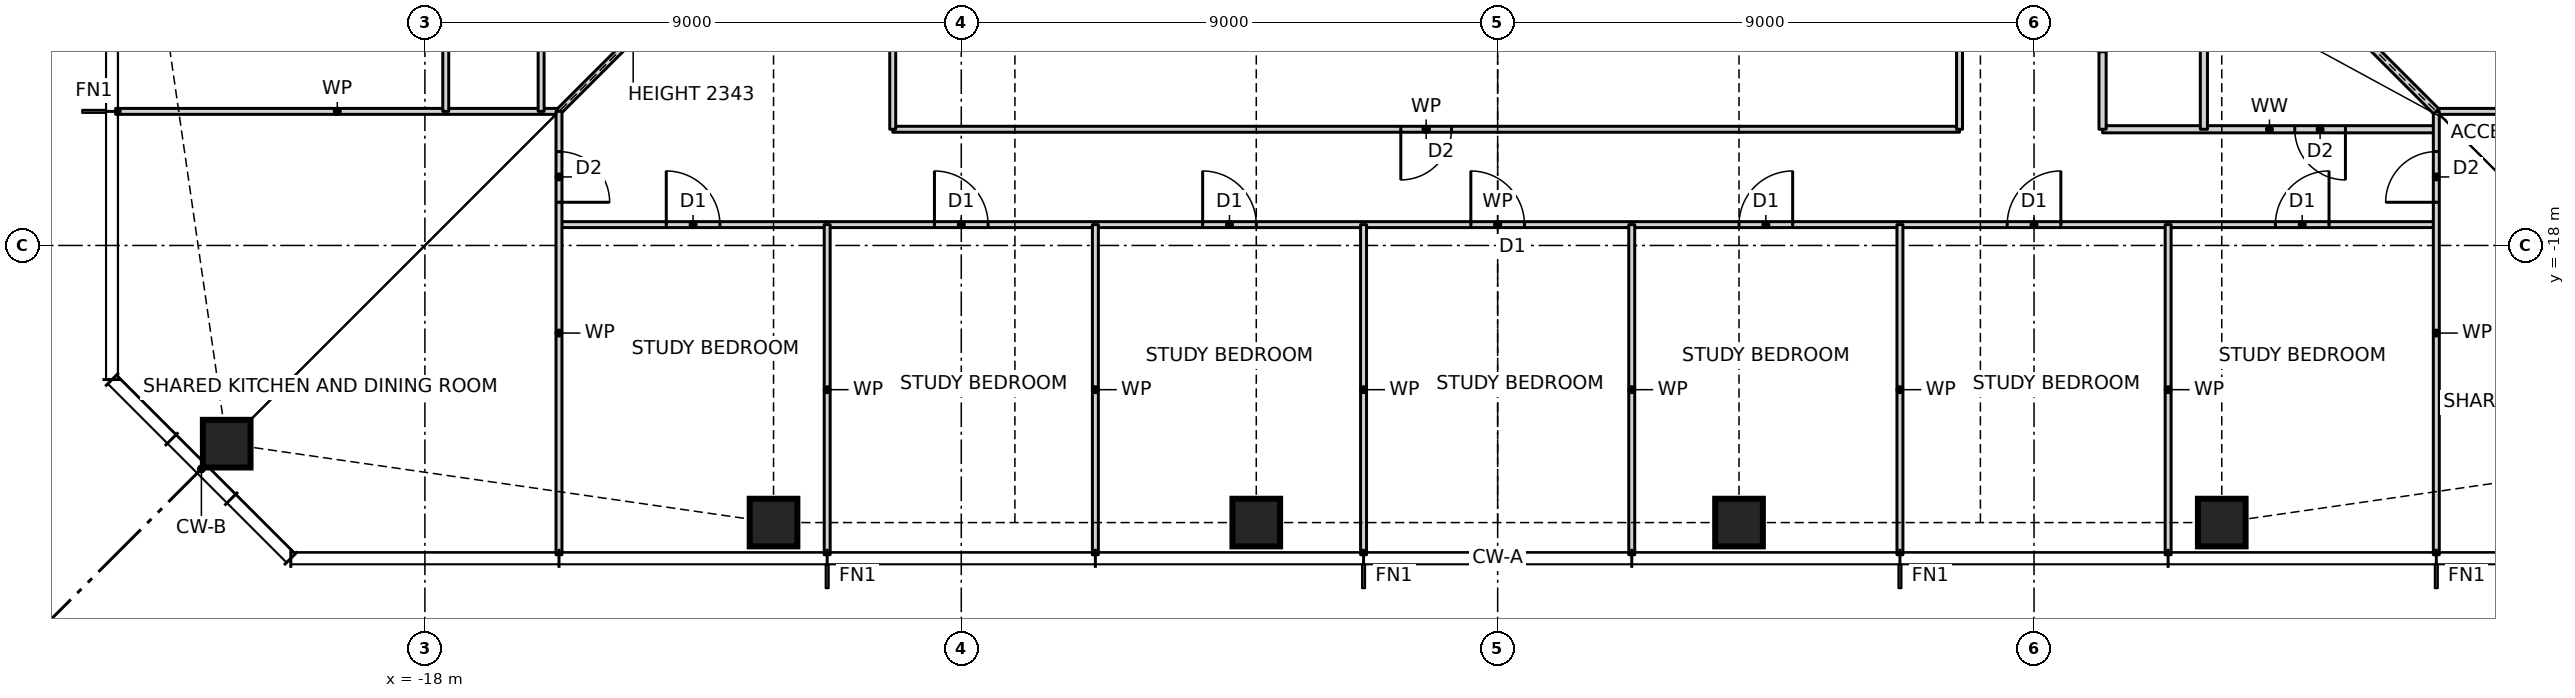
"""IFC4 building model, lengths in metres.
Left out: names, types, materials, properties, quantities, classifications, styles, units other than length and angle.
Written with IfcOpenShell. Run it as: python <this file> out.ifc"""

import sys

from ifc_helpers import new_model, si_unit, direction, frame, frame_2d, origin, origin_2d, place, context, subcontext, project, spatial, rectangle, hollow_rectangle, extrude, element, fill, save


model = new_model("IFC4")
c1 = context("Model", 3, precision=1e-05, world=origin(), true_north=direction((0.0, 1.0)))
c2 = subcontext(c1, "Body", "Model", "MODEL_VIEW")
j1 = project(units=[si_unit("LENGTHUNIT", "METRE"), si_unit("PLANEANGLEUNIT", "RADIAN")], contexts=[c1])
p1 = place(None, origin())
s1 = spatial("IfcSite", under=j1, at=p1, CompositionType="ELEMENT")
p2 = place(p1, origin())
s2 = spatial("IfcBuilding", under=s1, at=p2, CompositionType="ELEMENT")
p3 = place(p2, frame((0.0, 0.0, 15.0)))
s3 = spatial("IfcBuildingStorey", under=s2, at=p3, CompositionType="ELEMENT", Elevation=15.0)
for number, where, z_axis, x_axis in (
    (1, (-21.326, -21.326, 0.0), (0.0, 0.0, 1.0), (1.0, 0.0, 0.0)),
    (2, (-12.15, -22.65, 0.0), (0.0, 0.0, 1.0), (1.0, 0.0, 0.0)),
    (3, (-4.05, -22.65, 0.0), (0.0, 0.0, 1.0), (1.0, 0.0, 0.0)),
    (4, (4.05, -22.65, 0.0), (0.0, 0.0, 1.0), (1.0, 0.0, 0.0)),
    (5, (12.15, -22.65, 0.0), (0.0, 0.0, 1.0), (1.0, 0.0, 0.0)),
):
    element("IfcColumn", number, at=place(p3, frame(where, z_axis=z_axis, x_axis=x_axis)), inside=s3, PredefinedType="COLUMN", context=c2, shape_type="SweptSolid", body=[
        extrude(hollow_rectangle(XDim=0.8, YDim=0.8, WallThickness=0.09, at=origin_2d()), origin(), (0.0, 0.0, 1.0), 3.5),
    ])
p4 = place(p3, frame((-15.75, -17.65, 0.0), z_axis=(0.0, 0.0, 1.0), x_axis=(1.0, 0.0, 0.0)))
e6 = element("IfcWall", 6, at=p4, inside=s3, PredefinedType="PARTITIONING", context=c2, shape_type="SweptSolid", body=[
    extrude(rectangle(XDim=31.5, YDim=0.1, at=frame_2d((15.75, 0.0))), origin(), (0.0, 0.0, 1.0), 3.27),
])
p5 = place(p4, frame((1.8, 0.0, 0.0)))
e7 = element("IfcOpeningElement", 7, at=p5, cuts=e6, PredefinedType="OPENING", context=c2, shape_type="SweptSolid", body=[
    extrude(rectangle(XDim=0.9, YDim=2.1, at=frame_2d((0.45, 1.05))), frame((0.0, 0.06, 0.0), z_axis=(0.0, -1.0, 0.0), x_axis=(1.0, 0.0, 0.0)), (0.0, 0.0, 1.0), 0.12),
])
p6 = place(p4, frame((6.3, 0.0, 0.0)))
e8 = element("IfcOpeningElement", 8, at=p6, cuts=e6, PredefinedType="OPENING", context=c2, shape_type="SweptSolid", body=[
    extrude(rectangle(XDim=0.9, YDim=2.1, at=frame_2d((0.45, 1.05))), frame((0.0, 0.06, 0.0), z_axis=(0.0, -1.0, 0.0), x_axis=(1.0, 0.0, 0.0)), (0.0, 0.0, 1.0), 0.12),
])
p7 = place(p4, frame((10.8, 0.0, 0.0)))
e9 = element("IfcOpeningElement", 9, at=p7, cuts=e6, PredefinedType="OPENING", context=c2, shape_type="SweptSolid", body=[
    extrude(rectangle(XDim=0.9, YDim=2.1, at=frame_2d((0.45, 1.05))), frame((0.0, 0.06, 0.0), z_axis=(0.0, -1.0, 0.0), x_axis=(1.0, 0.0, 0.0)), (0.0, 0.0, 1.0), 0.12),
])
p8 = place(p4, frame((15.3, 0.0, 0.0)))
e10 = element("IfcOpeningElement", 10, at=p8, cuts=e6, PredefinedType="OPENING", context=c2, shape_type="SweptSolid", body=[
    extrude(rectangle(XDim=0.9, YDim=2.1, at=frame_2d((0.45, 1.05))), frame((0.0, 0.06, 0.0), z_axis=(0.0, -1.0, 0.0), x_axis=(1.0, 0.0, 0.0)), (0.0, 0.0, 1.0), 0.12),
])
p9 = place(p4, frame((19.8, 0.0, 0.0)))
e11 = element("IfcOpeningElement", 11, at=p9, cuts=e6, PredefinedType="OPENING", context=c2, shape_type="SweptSolid", body=[
    extrude(rectangle(XDim=0.9, YDim=2.1, at=frame_2d((0.45, 1.05))), frame((0.0, 0.06, 0.0), z_axis=(0.0, -1.0, 0.0), x_axis=(1.0, 0.0, 0.0)), (0.0, 0.0, 1.0), 0.12),
])
p10 = place(p4, frame((24.3, 0.0, 0.0)))
e12 = element("IfcOpeningElement", 12, at=p10, cuts=e6, PredefinedType="OPENING", context=c2, shape_type="SweptSolid", body=[
    extrude(rectangle(XDim=0.9, YDim=2.1, at=frame_2d((0.45, 1.05))), frame((0.0, 0.06, 0.0), z_axis=(0.0, -1.0, 0.0), x_axis=(1.0, 0.0, 0.0)), (0.0, 0.0, 1.0), 0.12),
])
p11 = place(p4, frame((28.8, 0.0, 0.0)))
e13 = element("IfcOpeningElement", 13, at=p11, cuts=e6, PredefinedType="OPENING", context=c2, shape_type="SweptSolid", body=[
    extrude(rectangle(XDim=0.9, YDim=2.1, at=frame_2d((0.45, 1.05))), frame((0.0, 0.06, 0.0), z_axis=(0.0, -1.0, 0.0), x_axis=(1.0, 0.0, 0.0)), (0.0, 0.0, 1.0), 0.12),
])
p12 = place(p3, frame((-10.15, -16.05, 0.0), z_axis=(0.0, 0.0, 1.0), x_axis=(1.0, 0.0, 0.0)))
e14 = element("IfcWall", 14, at=p12, inside=s3, PredefinedType="PARTITIONING", context=c2, shape_type="SweptSolid", body=[
    extrude(rectangle(XDim=17.9, YDim=0.1, at=frame_2d((8.95, 0.0))), origin(), (0.0, 0.0, 1.0), 3.27),
])
p13 = place(p12, frame((8.525, 0.0, 0.0)))
e15 = element("IfcOpeningElement", 15, at=p13, cuts=e14, PredefinedType="OPENING", context=c2, shape_type="SweptSolid", body=[
    extrude(rectangle(XDim=0.85, YDim=2.1, at=frame_2d((0.425, 1.05))), frame((0.0, 0.06, 0.0), z_axis=(0.0, -1.0, 0.0), x_axis=(1.0, 0.0, 0.0)), (0.0, 0.0, 1.0), 0.12),
])
p14 = place(p3, frame((10.15, -16.05, 0.0), z_axis=(0.0, 0.0, 1.0), x_axis=(1.0, 0.0, 0.0)))
e16 = element("IfcWall", 16, at=p14, inside=s3, PredefinedType="PARTITIONING", context=c2, shape_type="SweptSolid", body=[
    extrude(rectangle(XDim=5.6, YDim=0.12, at=frame_2d((2.8, 0.0))), origin(), (0.0, 0.0, 1.0), 3.27),
])
p15 = place(p14, frame((3.225, 0.0, 0.0)))
e17 = element("IfcOpeningElement", 17, at=p15, cuts=e16, PredefinedType="OPENING", context=c2, shape_type="SweptSolid", body=[
    extrude(rectangle(XDim=0.85, YDim=2.1, at=frame_2d((0.425, 1.05))), frame((0.0, 0.07, 0.0), z_axis=(0.0, -1.0, 0.0), x_axis=(1.0, 0.0, 0.0)), (0.0, 0.0, 1.0), 0.14),
])
for number, where, z_axis, x_axis in (
    (18, (-23.19, -15.75, 0.0), (0.0, 0.0, 1.0), (1.0, 0.0, 0.0)),
    (19, (15.75, -15.75, 0.0), (0.0, 0.0, 1.0), (1.0, 0.0, 0.0)),
):
    element("IfcWall", number, at=place(p3, frame(where, z_axis=z_axis, x_axis=x_axis)), inside=s3, PredefinedType="PARTITIONING", context=c2, shape_type="SweptSolid", body=[
        extrude(rectangle(XDim=7.44, YDim=0.1, at=frame_2d((3.72, 0.0))), origin(), (0.0, 0.0, 1.0), 3.27),
    ])
p16 = place(p3, frame((-15.75, -15.75, 0.0), z_axis=(0.0, 0.0, 1.0), x_axis=(0.707106781187, 0.707106781187, 0.0)))
e20 = element("IfcWall", 20, at=p16, inside=s3, PredefinedType="PARTITIONING", context=c2, shape_type="SweptSolid", body=[
    extrude(rectangle(XDim=5.869, YDim=0.1, at=frame_2d((2.935, 0.0))), origin(), (0.0, 0.0, 1.0), 2.343),
])
p17 = place(p3, frame((15.75, -23.19, 0.0), z_axis=(0.0, 0.0, 1.0), x_axis=(0.0, 1.0, 0.0)))
e21 = element("IfcWall", 21, at=p17, inside=s3, PredefinedType="PARTITIONING", context=c2, shape_type="SweptSolid", body=[
    extrude(rectangle(XDim=7.44, YDim=0.1, at=frame_2d((3.72, 0.0))), origin(), (0.0, 0.0, 1.0), 3.27),
])
p18 = place(p17, frame((5.915, 0.0, 0.0)))
e22 = element("IfcOpeningElement", 22, at=p18, cuts=e21, PredefinedType="OPENING", context=c2, shape_type="SweptSolid", body=[
    extrude(rectangle(XDim=0.85, YDim=2.1, at=frame_2d((0.425, 1.05))), frame((0.0, 0.06, 0.0), z_axis=(0.0, -1.0, 0.0), x_axis=(1.0, 0.0, 0.0)), (0.0, 0.0, 1.0), 0.12),
])
p19 = place(p3, frame((11.85, -16.05, 0.0), z_axis=(0.0, 0.0, 1.0), x_axis=(0.0, 1.0, 0.0)))
e23 = element("IfcWall", 23, at=p19, inside=s3, PredefinedType="PARTITIONING", context=c2, shape_type="SweptSolid", body=[
    extrude(rectangle(XDim=3.45, YDim=0.12, at=frame_2d((1.725, 0.0))), origin(), (0.0, 0.0, 1.0), 3.27),
])
p20 = place(p3, frame((11.25, -23.19, 0.0), z_axis=(0.0, 0.0, 1.0), x_axis=(0.0, 1.0, 0.0)))
e24 = element("IfcWall", 24, at=p20, inside=s3, PredefinedType="PARTITIONING", context=c2, shape_type="SweptSolid", body=[
    extrude(rectangle(XDim=5.54, YDim=0.1, at=frame_2d((2.77, 0.0))), origin(), (0.0, 0.0, 1.0), 3.27),
])
p21 = place(p3, frame((10.15, -16.05, 0.0), z_axis=(0.0, 0.0, 1.0), x_axis=(0.0, 1.0, 0.0)))
e25 = element("IfcWall", 25, at=p21, inside=s3, PredefinedType="PARTITIONING", context=c2, shape_type="SweptSolid", body=[
    extrude(rectangle(XDim=3.45, YDim=0.12, at=frame_2d((1.725, 0.0))), origin(), (0.0, 0.0, 1.0), 3.27),
])
p22 = place(p21, frame((1.3, 0.0, 0.0)))
e26 = element("IfcOpeningElement", 26, at=p22, cuts=e25, PredefinedType="OPENING", context=c2, shape_type="SweptSolid", body=[
    extrude(rectangle(XDim=0.85, YDim=2.1, at=frame_2d((0.425, 1.05))), frame((0.0, 0.07, 0.0), z_axis=(0.0, -1.0, 0.0), x_axis=(1.0, 0.0, 0.0)), (0.0, 0.0, 1.0), 0.14),
])
p23 = place(p3, frame((7.75, -16.05, 0.0), z_axis=(0.0, 0.0, 1.0), x_axis=(0.0, 1.0, 0.0)))
e27 = element("IfcWall", 27, at=p23, inside=s3, PredefinedType="PARTITIONING", context=c2, shape_type="SweptSolid", body=[
    extrude(rectangle(XDim=3.45, YDim=0.1, at=frame_2d((1.725, 0.0))), origin(), (0.0, 0.0, 1.0), 3.27),
])
for number, where, z_axis, x_axis in (
    (28, (6.75, -23.19, 0.0), (0.0, 0.0, 1.0), (0.0, 1.0, 0.0)),
    (29, (2.25, -23.19, 0.0), (0.0, 0.0, 1.0), (0.0, 1.0, 0.0)),
    (30, (-2.25, -23.19, 0.0), (0.0, 0.0, 1.0), (0.0, 1.0, 0.0)),
    (31, (-6.75, -23.19, 0.0), (0.0, 0.0, 1.0), (0.0, 1.0, 0.0)),
):
    element("IfcWall", number, at=place(p3, frame(where, z_axis=z_axis, x_axis=x_axis)), inside=s3, PredefinedType="PARTITIONING", context=c2, shape_type="SweptSolid", body=[
        extrude(rectangle(XDim=5.54, YDim=0.1, at=frame_2d((2.77, 0.0))), origin(), (0.0, 0.0, 1.0), 3.27),
    ])
p24 = place(p3, frame((-10.15, -16.05, 0.0), z_axis=(0.0, 0.0, 1.0), x_axis=(0.0, 1.0, 0.0)))
e32 = element("IfcWall", 32, at=p24, inside=s3, PredefinedType="PARTITIONING", context=c2, shape_type="SweptSolid", body=[
    extrude(rectangle(XDim=3.45, YDim=0.1, at=frame_2d((1.725, 0.0))), origin(), (0.0, 0.0, 1.0), 3.27),
])
p25 = place(p3, frame((-11.25, -23.19, 0.0), z_axis=(0.0, 0.0, 1.0), x_axis=(0.0, 1.0, 0.0)))
e33 = element("IfcWall", 33, at=p25, inside=s3, PredefinedType="PARTITIONING", context=c2, shape_type="SweptSolid", body=[
    extrude(rectangle(XDim=5.54, YDim=0.1, at=frame_2d((2.77, 0.0))), origin(), (0.0, 0.0, 1.0), 3.27),
])
p26 = place(p3, frame((-15.75, -23.19, 0.0), z_axis=(0.0, 0.0, 1.0), x_axis=(0.0, 1.0, 0.0)))
e34 = element("IfcWall", 34, at=p26, inside=s3, PredefinedType="PARTITIONING", context=c2, shape_type="SweptSolid", body=[
    extrude(rectangle(XDim=7.44, YDim=0.1, at=frame_2d((3.72, 0.0))), origin(), (0.0, 0.0, 1.0), 3.27),
])
p27 = place(p26, frame((5.915, 0.0, 0.0)))
e35 = element("IfcOpeningElement", 35, at=p27, cuts=e34, PredefinedType="OPENING", context=c2, shape_type="SweptSolid", body=[
    extrude(rectangle(XDim=0.85, YDim=2.1, at=frame_2d((0.425, 1.05))), frame((0.0, 0.06, 0.0), z_axis=(0.0, -1.0, 0.0), x_axis=(1.0, 0.0, 0.0)), (0.0, 0.0, 1.0), 0.12),
])
p28 = place(p3, frame((-16.05, -15.75, 0.0), z_axis=(0.0, 0.0, 1.0), x_axis=(0.0, 1.0, 0.0)))
e36 = element("IfcWall", 36, at=p28, inside=s3, PredefinedType="PARTITIONING", context=c2, shape_type="SweptSolid", body=[
    extrude(rectangle(XDim=19.5, YDim=0.1, at=frame_2d((9.75, 0.0))), origin(), (0.0, 0.0, 1.0), 3.27),
])
p29 = place(p28, frame((9.325, 0.0, 0.0)))
e37 = element("IfcOpeningElement", 37, at=p29, cuts=e36, PredefinedType="OPENING", context=c2, shape_type="SweptSolid", body=[
    extrude(rectangle(XDim=0.85, YDim=2.1, at=frame_2d((0.425, 1.05))), frame((0.0, 0.06, 0.0), z_axis=(0.0, -1.0, 0.0), x_axis=(1.0, 0.0, 0.0)), (0.0, 0.0, 1.0), 0.12),
])
p30 = place(p3, frame((-17.65, -15.75, 0.0), z_axis=(0.0, 0.0, 1.0), x_axis=(0.0, 1.0, 0.0)))
e38 = element("IfcWall", 38, at=p30, inside=s3, PredefinedType="PARTITIONING", context=c2, shape_type="SweptSolid", body=[
    extrude(rectangle(XDim=31.5, YDim=0.1, at=frame_2d((15.75, 0.0))), origin(), (0.0, 0.0, 1.0), 3.27),
])
p31 = place(p30, frame((28.8, 0.0, 0.0)))
e39 = element("IfcOpeningElement", 39, at=p31, cuts=e38, PredefinedType="OPENING", context=c2, shape_type="SweptSolid", body=[
    extrude(rectangle(XDim=0.9, YDim=2.1, at=frame_2d((0.45, 1.05))), frame((0.0, 0.06, 0.0), z_axis=(0.0, -1.0, 0.0), x_axis=(1.0, 0.0, 0.0)), (0.0, 0.0, 1.0), 0.12),
])
p32 = place(p30, frame((24.3, 0.0, 0.0)))
e40 = element("IfcOpeningElement", 40, at=p32, cuts=e38, PredefinedType="OPENING", context=c2, shape_type="SweptSolid", body=[
    extrude(rectangle(XDim=0.9, YDim=2.1, at=frame_2d((0.45, 1.05))), frame((0.0, 0.06, 0.0), z_axis=(0.0, -1.0, 0.0), x_axis=(1.0, 0.0, 0.0)), (0.0, 0.0, 1.0), 0.12),
])
p33 = place(p30, frame((19.8, 0.0, 0.0)))
e41 = element("IfcOpeningElement", 41, at=p33, cuts=e38, PredefinedType="OPENING", context=c2, shape_type="SweptSolid", body=[
    extrude(rectangle(XDim=0.9, YDim=2.1, at=frame_2d((0.45, 1.05))), frame((0.0, 0.06, 0.0), z_axis=(0.0, -1.0, 0.0), x_axis=(1.0, 0.0, 0.0)), (0.0, 0.0, 1.0), 0.12),
])
p34 = place(p30, frame((15.3, 0.0, 0.0)))
e42 = element("IfcOpeningElement", 42, at=p34, cuts=e38, PredefinedType="OPENING", context=c2, shape_type="SweptSolid", body=[
    extrude(rectangle(XDim=0.9, YDim=2.1, at=frame_2d((0.45, 1.05))), frame((0.0, 0.06, 0.0), z_axis=(0.0, -1.0, 0.0), x_axis=(1.0, 0.0, 0.0)), (0.0, 0.0, 1.0), 0.12),
])
p35 = place(p30, frame((10.8, 0.0, 0.0)))
e43 = element("IfcOpeningElement", 43, at=p35, cuts=e38, PredefinedType="OPENING", context=c2, shape_type="SweptSolid", body=[
    extrude(rectangle(XDim=0.9, YDim=2.1, at=frame_2d((0.45, 1.05))), frame((0.0, 0.06, 0.0), z_axis=(0.0, -1.0, 0.0), x_axis=(1.0, 0.0, 0.0)), (0.0, 0.0, 1.0), 0.12),
])
p36 = place(p30, frame((6.3, 0.0, 0.0)))
e44 = element("IfcOpeningElement", 44, at=p36, cuts=e38, PredefinedType="OPENING", context=c2, shape_type="SweptSolid", body=[
    extrude(rectangle(XDim=0.9, YDim=2.1, at=frame_2d((0.45, 1.05))), frame((0.0, 0.06, 0.0), z_axis=(0.0, -1.0, 0.0), x_axis=(1.0, 0.0, 0.0)), (0.0, 0.0, 1.0), 0.12),
])
p37 = place(p30, frame((1.8, 0.0, 0.0)))
e45 = element("IfcOpeningElement", 45, at=p37, cuts=e38, PredefinedType="OPENING", context=c2, shape_type="SweptSolid", body=[
    extrude(rectangle(XDim=0.9, YDim=2.1, at=frame_2d((0.45, 1.05))), frame((0.0, 0.06, 0.0), z_axis=(0.0, -1.0, 0.0), x_axis=(1.0, 0.0, 0.0)), (0.0, 0.0, 1.0), 0.12),
])
p38 = place(p3, frame((15.75, -15.75, 0.0), z_axis=(0.0, 0.0, 1.0), x_axis=(-0.707106781187, 0.707106781187, 0.0)))
e46 = element("IfcWall", 46, at=p38, inside=s3, PredefinedType="PARTITIONING", context=c2, shape_type="SweptSolid", body=[
    extrude(rectangle(XDim=5.869, YDim=0.12, at=frame_2d((2.935, 0.0))), origin(), (0.0, 0.0, 1.0), 2.343),
])
p39 = place(p5, origin())
e47 = element("IfcDoor", 47, at=p39, inside=s3, OperationType="SINGLE_SWING_LEFT", PredefinedType="DOOR", context=c2, shape_type="SweptSolid", body=[
    extrude(rectangle(XDim=0.9, YDim=2.1, at=frame_2d((0.45, 1.05))), frame((0.0, 0.025, 0.0), z_axis=(0.0, -1.0, 0.0), x_axis=(1.0, 0.0, 0.0)), (0.0, 0.0, 1.0), 0.05),
])
fill(e7, e47)
p40 = place(p6, origin())
e48 = element("IfcDoor", 48, at=p40, inside=s3, OperationType="SINGLE_SWING_LEFT", PredefinedType="DOOR", context=c2, shape_type="SweptSolid", body=[
    extrude(rectangle(XDim=0.9, YDim=2.1, at=frame_2d((0.45, 1.05))), frame((0.0, 0.025, 0.0), z_axis=(0.0, -1.0, 0.0), x_axis=(1.0, 0.0, 0.0)), (0.0, 0.0, 1.0), 0.05),
])
fill(e8, e48)
p41 = place(p7, origin())
e49 = element("IfcDoor", 49, at=p41, inside=s3, OperationType="SINGLE_SWING_LEFT", PredefinedType="DOOR", context=c2, shape_type="SweptSolid", body=[
    extrude(rectangle(XDim=0.9, YDim=2.1, at=frame_2d((0.45, 1.05))), frame((0.0, 0.025, 0.0), z_axis=(0.0, -1.0, 0.0), x_axis=(1.0, 0.0, 0.0)), (0.0, 0.0, 1.0), 0.05),
])
fill(e9, e49)
p42 = place(p8, origin())
e50 = element("IfcDoor", 50, at=p42, inside=s3, OperationType="SINGLE_SWING_LEFT", PredefinedType="DOOR", context=c2, shape_type="SweptSolid", body=[
    extrude(rectangle(XDim=0.9, YDim=2.1, at=frame_2d((0.45, 1.05))), frame((0.0, 0.025, 0.0), z_axis=(0.0, -1.0, 0.0), x_axis=(1.0, 0.0, 0.0)), (0.0, 0.0, 1.0), 0.05),
])
fill(e10, e50)
p43 = place(p9, origin())
e51 = element("IfcDoor", 51, at=p43, inside=s3, OperationType="SINGLE_SWING_RIGHT", PredefinedType="DOOR", context=c2, shape_type="SweptSolid", body=[
    extrude(rectangle(XDim=0.9, YDim=2.1, at=frame_2d((0.45, 1.05))), frame((0.0, 0.025, 0.0), z_axis=(0.0, -1.0, 0.0), x_axis=(1.0, 0.0, 0.0)), (0.0, 0.0, 1.0), 0.05),
])
fill(e11, e51)
p44 = place(p10, origin())
e52 = element("IfcDoor", 52, at=p44, inside=s3, OperationType="SINGLE_SWING_RIGHT", PredefinedType="DOOR", context=c2, shape_type="SweptSolid", body=[
    extrude(rectangle(XDim=0.9, YDim=2.1, at=frame_2d((0.45, 1.05))), frame((0.0, 0.025, 0.0), z_axis=(0.0, -1.0, 0.0), x_axis=(1.0, 0.0, 0.0)), (0.0, 0.0, 1.0), 0.05),
])
fill(e12, e52)
p45 = place(p11, origin())
e53 = element("IfcDoor", 53, at=p45, inside=s3, OperationType="SINGLE_SWING_RIGHT", PredefinedType="DOOR", context=c2, shape_type="SweptSolid", body=[
    extrude(rectangle(XDim=0.9, YDim=2.1, at=frame_2d((0.45, 1.05))), frame((0.0, 0.025, 0.0), z_axis=(0.0, -1.0, 0.0), x_axis=(1.0, 0.0, 0.0)), (0.0, 0.0, 1.0), 0.05),
])
fill(e13, e53)
p46 = place(p13, frame((0.85, 0.0, 0.0), z_axis=(0.0, 0.0, 1.0), x_axis=(-1.0, 0.0, 0.0)))
e54 = element("IfcDoor", 54, at=p46, inside=s3, OperationType="SINGLE_SWING_RIGHT", PredefinedType="DOOR", context=c2, shape_type="SweptSolid", body=[
    extrude(rectangle(XDim=0.85, YDim=2.1, at=frame_2d((0.425, 1.05))), frame((0.0, 0.025, 0.0), z_axis=(0.0, -1.0, 0.0), x_axis=(1.0, 0.0, 0.0)), (0.0, 0.0, 1.0), 0.05),
])
fill(e15, e54)
p47 = place(p15, frame((0.85, 0.0, 0.0), z_axis=(0.0, 0.0, 1.0), x_axis=(-1.0, 0.0, 0.0)))
e55 = element("IfcDoor", 55, at=p47, inside=s3, OperationType="SINGLE_SWING_LEFT", PredefinedType="DOOR", context=c2, shape_type="SweptSolid", body=[
    extrude(rectangle(XDim=0.85, YDim=2.1, at=frame_2d((0.425, 1.05))), frame((0.0, 0.025, 0.0), z_axis=(0.0, -1.0, 0.0), x_axis=(1.0, 0.0, 0.0)), (0.0, 0.0, 1.0), 0.05),
])
fill(e17, e55)
p48 = place(p27, frame((0.85, 0.0, 0.0), z_axis=(0.0, 0.0, 1.0), x_axis=(-1.0, 0.0, 0.0)))
e56 = element("IfcDoor", 56, at=p48, inside=s3, OperationType="SINGLE_SWING_RIGHT", PredefinedType="DOOR", context=c2, shape_type="SweptSolid", body=[
    extrude(rectangle(XDim=0.85, YDim=2.1, at=frame_2d((0.425, 1.05))), frame((0.0, 0.025, 0.0), z_axis=(0.0, -1.0, 0.0), x_axis=(1.0, 0.0, 0.0)), (0.0, 0.0, 1.0), 0.05),
])
fill(e35, e56)
p49 = place(p18, origin())
e57 = element("IfcDoor", 57, at=p49, inside=s3, OperationType="SINGLE_SWING_LEFT", PredefinedType="DOOR", context=c2, shape_type="SweptSolid", body=[
    extrude(rectangle(XDim=0.85, YDim=2.1, at=frame_2d((0.425, 1.05))), frame((0.0, 0.025, 0.0), z_axis=(0.0, -1.0, 0.0), x_axis=(1.0, 0.0, 0.0)), (0.0, 0.0, 1.0), 0.05),
])
fill(e22, e57)
save(model, sys.argv[1])
